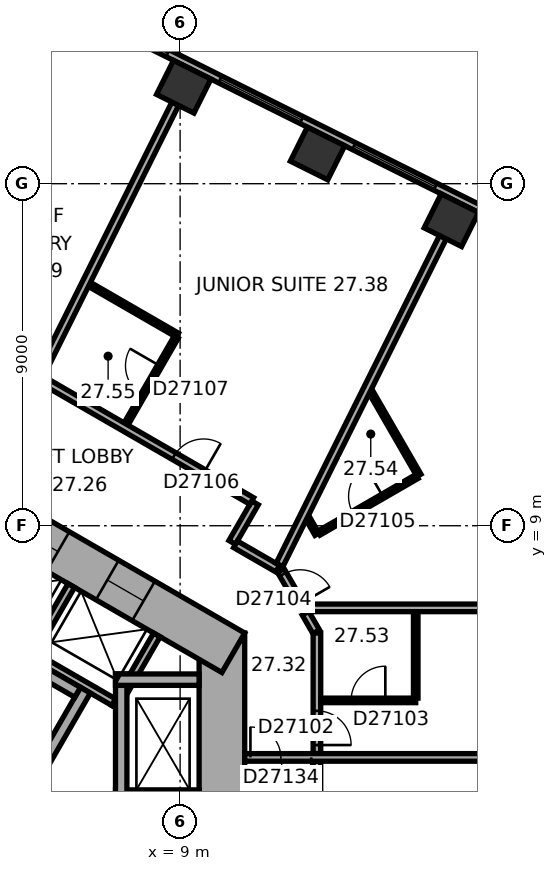
"""IFC4 building model, lengths in metres.
Left out: names, types, materials, properties, quantities, classifications, styles, units other than length and angle.
Written with IfcOpenShell. Run it as: python <this file> out.ifc"""

import sys

from ifc_helpers import new_model, si_unit, direction, frame, frame_2d, origin, origin_2d, place, context, subcontext, project, spatial, rectangle, extrude, element, fill, save


model = new_model("IFC4")
c1 = context("Model", 3, precision=1e-05, world=origin(), true_north=direction((0.0, 1.0)))
c2 = subcontext(c1, "Body", "Model", "MODEL_VIEW")
j1 = project(units=[si_unit("LENGTHUNIT", "METRE"), si_unit("PLANEANGLEUNIT", "RADIAN")], contexts=[c1])
p1 = place(None, origin())
s1 = spatial("IfcSite", under=j1, at=p1, CompositionType="ELEMENT")
p2 = place(p1, origin())
s2 = spatial("IfcBuilding", under=s1, at=p2, CompositionType="ELEMENT")
p3 = place(p2, frame((0.0, 0.0, 113.3)))
s3 = spatial("IfcBuildingStorey", under=s2, at=p3, CompositionType="ELEMENT", Elevation=113.3)
for number, where, z_axis, x_axis in (
    (1, (16.138, 17.04, 0.0), (0.0, 0.0, 1.0), (-0.895, 0.446, 0.0)),
    (2, (12.616, 18.795, 0.0), (0.0, 0.0, 1.0), (-0.895, 0.446, 0.0)),
    (3, (9.095, 20.551, 0.0), (0.0, 0.0, 1.0), (-0.895, 0.446, 0.0)),
):
    element("IfcColumn", number, at=place(p3, frame(where, z_axis=z_axis, x_axis=x_axis)), inside=s3, PredefinedType="COLUMN", context=c2, shape_type="SweptSolid", body=[
        extrude(rectangle(XDim=1.1, YDim=1.0, at=origin_2d()), origin(), (0.0, 0.0, 1.0), 3.3),
    ])
p4 = place(p3, frame((10.1, -6.177, 0.0), z_axis=(0.0, 0.0, 1.0), x_axis=(0.0, 1.0, 0.0)))
e4 = element("IfcWall", 4, at=p4, inside=s3, PredefinedType="SHEAR", context=c2, shape_type="SweptSolid", body=[
    extrude(rectangle(XDim=12.355, YDim=1.2, at=frame_2d((6.177, 0.0))), origin(), (0.0, 0.0, 1.0), 3.3),
])
p5 = place(p4, frame((6.378, 0.0, 0.0)))
e5 = element("IfcOpeningElement", 5, at=p5, cuts=e4, PredefinedType="OPENING", context=c2, shape_type="SweptSolid", body=[
    extrude(rectangle(XDim=1.5, YDim=2.1, at=frame_2d((0.75, 1.05))), frame((0.0, 0.61, 0.0), z_axis=(0.0, -1.0, 0.0), x_axis=(1.0, 0.0, 0.0)), (0.0, 0.0, 1.0), 1.22),
])
p6 = place(p4, frame((1.828, 0.0, 0.0)))
e6 = element("IfcOpeningElement", 6, at=p6, cuts=e4, PredefinedType="OPENING", context=c2, shape_type="SweptSolid", body=[
    extrude(rectangle(XDim=1.1, YDim=2.1, at=frame_2d((0.55, 1.05))), frame((0.0, 0.61, 0.0), z_axis=(0.0, -1.0, 0.0), x_axis=(1.0, 0.0, 0.0)), (0.0, 0.0, 1.0), 1.22),
])
p7 = place(p4, frame((4.427, 0.0, 0.0)))
e7 = element("IfcOpeningElement", 7, at=p7, cuts=e4, PredefinedType="OPENING", context=c2, shape_type="SweptSolid", body=[
    extrude(rectangle(XDim=1.1, YDim=2.1, at=frame_2d((0.55, 1.05))), frame((0.0, 0.61, 0.0), z_axis=(0.0, -1.0, 0.0), x_axis=(1.0, 0.0, 0.0)), (0.0, 0.0, 1.0), 1.22),
])
p8 = place(p3, frame((10.4, 5.658, 0.0), z_axis=(0.0, 0.0, 1.0), x_axis=(-0.866021384402, 0.500006961711, 0.0)))
e8 = element("IfcWall", 8, at=p8, inside=s3, PredefinedType="SHEAR", context=c2, shape_type="SweptSolid", body=[
    extrude(rectangle(XDim=12.355, YDim=1.2, at=frame_2d((6.178, 0.0))), origin(), (0.0, 0.0, 1.0), 3.3),
])
p9 = place(p8, frame((2.728, 0.0, 0.0)))
e9 = element("IfcOpeningElement", 9, at=p9, cuts=e8, PredefinedType="OPENING", context=c2, shape_type="SweptSolid", body=[
    extrude(rectangle(XDim=1.1, YDim=2.1, at=frame_2d((0.55, 1.05))), frame((0.0, 0.61, 0.0), z_axis=(0.0, -1.0, 0.0), x_axis=(1.0, 0.0, 0.0)), (0.0, 0.0, 1.0), 1.22),
])
p10 = place(p8, frame((5.328, 0.0, 0.0)))
e10 = element("IfcOpeningElement", 10, at=p10, cuts=e8, PredefinedType="OPENING", context=c2, shape_type="SweptSolid", body=[
    extrude(rectangle(XDim=1.1, YDim=2.1, at=frame_2d((0.55, 1.05))), frame((0.0, 0.61, 0.0), z_axis=(0.0, -1.0, 0.0), x_axis=(1.0, 0.0, 0.0)), (0.0, 0.0, 1.0), 1.22),
])
p11 = place(p8, frame((7.928, 0.0, 0.0)))
e11 = element("IfcOpeningElement", 11, at=p11, cuts=e8, PredefinedType="OPENING", context=c2, shape_type="SweptSolid", body=[
    extrude(rectangle(XDim=1.1, YDim=2.1, at=frame_2d((0.55, 1.05))), frame((0.0, 0.61, 0.0), z_axis=(0.0, -1.0, 0.0), x_axis=(1.0, 0.0, 0.0)), (0.0, 0.0, 1.0), 1.22),
])
p12 = place(p3, frame((20.63, 15.47, 0.0), z_axis=(0.0, 0.0, 1.0), x_axis=(-0.894934518609, 0.446197498203, 0.0)))
e12 = element("IfcWall", 12, at=p12, inside=s3, PredefinedType="STANDARD", context=c2, shape_type="SweptSolid", body=[
    extrude(rectangle(XDim=21.246, YDim=0.2, at=frame_2d((10.623, 0.0))), origin(), (0.0, 0.0, 1.0), 3.3),
])
p13 = place(p12, frame((1.553, 0.0, 0.8)))
e13 = element("IfcOpeningElement", 13, at=p13, cuts=e12, PredefinedType="OPENING", context=c2, shape_type="SweptSolid", body=[
    extrude(rectangle(XDim=2.4, YDim=1.7, at=frame_2d((1.2, 0.85))), frame((0.0, 0.11, 0.0), z_axis=(0.0, -1.0, 0.0), x_axis=(1.0, 0.0, 0.0)), (0.0, 0.0, 1.0), 0.22),
])
p14 = place(p12, frame((5.488, 0.0, 0.8)))
e14 = element("IfcOpeningElement", 14, at=p14, cuts=e12, PredefinedType="OPENING", context=c2, shape_type="SweptSolid", body=[
    extrude(rectangle(XDim=2.4, YDim=1.7, at=frame_2d((1.2, 0.85))), frame((0.0, 0.11, 0.0), z_axis=(0.0, -1.0, 0.0), x_axis=(1.0, 0.0, 0.0)), (0.0, 0.0, 1.0), 0.22),
])
p15 = place(p12, frame((9.422, 0.0, 0.8)))
e15 = element("IfcOpeningElement", 15, at=p15, cuts=e12, PredefinedType="OPENING", context=c2, shape_type="SweptSolid", body=[
    extrude(rectangle(XDim=2.4, YDim=1.7, at=frame_2d((1.2, 0.85))), frame((0.0, 0.11, 0.0), z_axis=(0.0, -1.0, 0.0), x_axis=(1.0, 0.0, 0.0)), (0.0, 0.0, 1.0), 0.22),
])
p16 = place(p12, frame((13.357, 0.0, 0.8)))
e16 = element("IfcOpeningElement", 16, at=p16, cuts=e12, PredefinedType="OPENING", context=c2, shape_type="SweptSolid", body=[
    extrude(rectangle(XDim=2.4, YDim=1.7, at=frame_2d((1.2, 0.85))), frame((0.0, 0.11, 0.0), z_axis=(0.0, -1.0, 0.0), x_axis=(1.0, 0.0, 0.0)), (0.0, 0.0, 1.0), 0.22),
])
p17 = place(p12, frame((17.292, 0.0, 0.8)))
e17 = element("IfcOpeningElement", 17, at=p17, cuts=e12, PredefinedType="OPENING", context=c2, shape_type="SweptSolid", body=[
    extrude(rectangle(XDim=2.4, YDim=1.7, at=frame_2d((1.2, 0.85))), frame((0.0, 0.11, 0.0), z_axis=(0.0, -1.0, 0.0), x_axis=(1.0, 0.0, 0.0)), (0.0, 0.0, 1.0), 0.22),
])
p18 = place(p3, frame((7.424, 4.259, 0.0), z_axis=(0.0, 0.0, 1.0), x_axis=(-0.866026010844, 0.49999894854, 0.0)))
e18 = element("IfcWall", 18, at=p18, inside=s3, PredefinedType="PARTITIONING", context=c2, shape_type="SweptSolid", body=[
    extrude(rectangle(XDim=8.0, YDim=0.2, at=frame_2d((4.0, 0.0))), origin(), (0.0, 0.0, 1.0), 3.05),
])
for number, where, z_axis, x_axis in (
    (19, (7.287, 4.222, 0.0), (0.0, 0.0, 1.0), (0.5, 0.866, 0.0)),
    (20, (5.036, 5.522, 0.0), (0.0, 0.0, 1.0), (0.5, 0.866, 0.0)),
):
    element("IfcWall", number, at=place(p3, frame(where, z_axis=z_axis, x_axis=x_axis)), inside=s3, PredefinedType="PARTITIONING", context=c2, shape_type="SweptSolid", body=[
        extrude(rectangle(XDim=2.2, YDim=0.2, at=frame_2d((1.1, 0.0))), origin(), (0.0, 0.0, 1.0), 3.05),
    ])
p19 = place(p3, frame((4.158, 0.602, 0.0), z_axis=(0.0, 0.0, 1.0), x_axis=(0.499977259774, 0.866038532462, 0.0)))
e21 = element("IfcWall", 21, at=p19, inside=s3, PredefinedType="SHEAR", context=c2, shape_type="SweptSolid", body=[
    extrude(rectangle(XDim=4.7, YDim=0.3, at=frame_2d((2.35, 0.0))), origin(), (0.0, 0.0, 1.0), 3.05),
])
p20 = place(p19, frame((0.8, 0.0, 0.0)))
e22 = element("IfcOpeningElement", 22, at=p20, cuts=e21, PredefinedType="OPENING", context=c2, shape_type="SweptSolid", body=[
    extrude(rectangle(XDim=1.2, YDim=2.1, at=frame_2d((0.6, 1.05))), frame((0.0, 0.16, 0.0), z_axis=(0.0, -1.0, 0.0), x_axis=(1.0, 0.0, 0.0)), (0.0, 0.0, 1.0), 0.32),
])
p21 = place(p3, frame((6.303, 4.617, 0.0), z_axis=(0.0, 0.0, 1.0), x_axis=(-0.866027801685, 0.499995846692, 0.0)))
e23 = element("IfcWall", 23, at=p21, inside=s3, PredefinedType="SHEAR", context=c2, shape_type="SweptSolid", body=[
    extrude(rectangle(XDim=7.06, YDim=0.3, at=frame_2d((3.53, 0.0))), origin(), (0.0, 0.0, 1.0), 3.05),
])
p22 = place(p3, frame((7.3, 1.9, 0.0), z_axis=(0.0, 0.0, 1.0), x_axis=(1.0, 0.0, 0.0)))
e24 = element("IfcWall", 24, at=p22, inside=s3, PredefinedType="SHEAR", context=c2, shape_type="SweptSolid", body=[
    extrude(rectangle(XDim=2.2, YDim=0.3, at=frame_2d((1.1, 0.0))), origin(), (0.0, 0.0, 1.0), 3.05),
])
p23 = place(p22, frame((0.7, 0.0, 0.0)))
e25 = element("IfcOpeningElement", 25, at=p23, cuts=e24, PredefinedType="OPENING", context=c2, shape_type="SweptSolid", body=[
    extrude(rectangle(XDim=1.1, YDim=2.1, at=frame_2d((0.55, 1.05))), frame((0.0, 0.16, 0.0), z_axis=(0.0, -1.0, 0.0), x_axis=(1.0, 0.0, 0.0)), (0.0, 0.0, 1.0), 0.32),
])
p24 = place(p3, frame((7.45, 1.75, 0.0), z_axis=(0.0, 0.0, 1.0), x_axis=(0.0, 1.0, 0.0)))
e26 = element("IfcWall", 26, at=p24, inside=s3, PredefinedType="SHEAR", context=c2, shape_type="SweptSolid", body=[
    extrude(rectangle(XDim=3.35, YDim=0.3, at=frame_2d((1.675, 0.0))), origin(), (0.0, 0.0, 1.0), 3.05),
])
p25 = place(p3, frame((7.3, 4.95, 0.0), z_axis=(0.0, 0.0, 1.0), x_axis=(1.0, 0.0, 0.0)))
e27 = element("IfcWall", 27, at=p25, inside=s3, PredefinedType="SHEAR", context=c2, shape_type="SweptSolid", body=[
    extrude(rectangle(XDim=2.2, YDim=0.3, at=frame_2d((1.1, 0.0))), origin(), (0.0, 0.0, 1.0), 3.05),
])
p26 = place(p3, frame((6.614, 15.351, 0.0), z_axis=(0.0, 0.0, 1.0), x_axis=(0.866024262117, -0.500001977421, 0.0)))
e28 = element("IfcWall", 28, at=p26, inside=s3, PredefinedType="PARTITIONING", context=c2, shape_type="SweptSolid", body=[
    extrude(rectangle(XDim=2.671, YDim=0.12, at=frame_2d((1.336, 0.0))), origin(), (0.0, 0.0, 1.0), 3.05),
])
p27 = place(p3, frame((8.872, 20.104, 0.0), z_axis=(0.0, 0.0, 1.0), x_axis=(-0.446218378653, -0.894924107706, 0.0)))
e29 = element("IfcWall", 29, at=p27, inside=s3, PredefinedType="PARTITIONING", context=c2, shape_type="SweptSolid", body=[
    extrude(rectangle(XDim=7.95, YDim=0.2, at=frame_2d((3.975, 0.0))), origin(), (0.0, 0.0, 1.0), 3.05),
])
p28 = place(p3, frame((8.897, 13.963, 0.0), z_axis=(0.0, 0.0, 1.0), x_axis=(-0.500048002682, -0.865997687649, 0.0)))
e30 = element("IfcWall", 30, at=p28, inside=s3, PredefinedType="PARTITIONING", context=c2, shape_type="SweptSolid", body=[
    extrude(rectangle(XDim=2.64, YDim=0.12, at=frame_2d((1.32, 0.0))), origin(), (0.0, 0.0, 1.0), 2.6),
])
p29 = place(p28, frame((0.87, 0.0, 0.0)))
e31 = element("IfcOpeningElement", 31, at=p29, cuts=e30, PredefinedType="OPENING", context=c2, shape_type="SweptSolid", body=[
    extrude(rectangle(XDim=0.9, YDim=2.1, at=frame_2d((0.45, 1.05))), frame((0.0, 0.07, 0.0), z_axis=(0.0, -1.0, 0.0), x_axis=(1.0, 0.0, 0.0)), (0.0, 0.0, 1.0), 0.14),
])
p30 = place(p3, frame((10.371, 8.561, 0.0), z_axis=(0.0, 0.0, 1.0), x_axis=(0.499986357472, 0.866033280158, 0.0)))
e32 = element("IfcWall", 32, at=p30, inside=s3, PredefinedType="PARTITIONING", context=c2, shape_type="SweptSolid", body=[
    extrude(rectangle(XDim=1.201, YDim=0.2, at=frame_2d((0.601, 0.0))), origin(), (0.0, 0.0, 1.0), 3.05),
])
p31 = place(p3, frame((10.885, 9.652, 0.0), z_axis=(0.0, 0.0, 1.0), x_axis=(-0.866033868542, 0.499985338323, 0.0)))
e33 = element("IfcWall", 33, at=p31, inside=s3, PredefinedType="PARTITIONING", context=c2, shape_type="SweptSolid", body=[
    extrude(rectangle(XDim=8.602, YDim=0.2, at=frame_2d((4.301, 0.0))), origin(), (0.0, 0.0, 1.0), 3.05),
])
p32 = place(p31, frame((1.464, 0.0, 0.0)))
e34 = element("IfcOpeningElement", 34, at=p32, cuts=e33, PredefinedType="OPENING", context=c2, shape_type="SweptSolid", body=[
    extrude(rectangle(XDim=0.9, YDim=2.1, at=frame_2d((0.45, 1.05))), frame((0.0, 0.11, 0.0), z_axis=(0.0, -1.0, 0.0), x_axis=(1.0, 0.0, 0.0)), (0.0, 0.0, 1.0), 0.22),
])
p33 = place(p31, frame((7.09, 0.0, 0.0)))
e35 = element("IfcOpeningElement", 35, at=p33, cuts=e33, PredefinedType="OPENING", context=c2, shape_type="SweptSolid", body=[
    extrude(rectangle(XDim=0.9, YDim=2.1, at=frame_2d((0.45, 1.05))), frame((0.0, 0.11, 0.0), z_axis=(0.0, -1.0, 0.0), x_axis=(1.0, 0.0, 0.0)), (0.0, 0.0, 1.0), 0.22),
])
p34 = place(p3, frame((11.566, 7.871, 0.0), z_axis=(0.0, 0.0, 1.0), x_axis=(-0.866004557827, 0.500036104519, 0.0)))
e36 = element("IfcWall", 36, at=p34, inside=s3, PredefinedType="PARTITIONING", context=c2, shape_type="SweptSolid", body=[
    extrude(rectangle(XDim=1.28, YDim=0.2, at=frame_2d((0.64, 0.0))), origin(), (0.0, 0.0, 1.0), 3.05),
])
p35 = place(p3, frame((12.218, 6.839, 0.0), z_axis=(0.0, 0.0, 1.0), x_axis=(-0.500044870432, 0.865999496279, 0.0)))
e37 = element("IfcWall", 37, at=p35, inside=s3, PredefinedType="PARTITIONING", context=c2, shape_type="SweptSolid", body=[
    extrude(rectangle(XDim=1.136, YDim=0.2, at=frame_2d((0.568, 0.0))), origin(), (0.0, 0.0, 1.0), 3.05),
])
p36 = place(p35, frame((0.118, 0.0, 0.0)))
e38 = element("IfcOpeningElement", 38, at=p36, cuts=e37, PredefinedType="OPENING", context=c2, shape_type="SweptSolid", body=[
    extrude(rectangle(XDim=0.9, YDim=2.1, at=frame_2d((0.45, 1.05))), frame((0.0, 0.11, 0.0), z_axis=(0.0, -1.0, 0.0), x_axis=(1.0, 0.0, 0.0)), (0.0, 0.0, 1.0), 0.22),
])
p37 = place(p3, frame((12.58, 6.212, 0.0), z_axis=(0.0, 0.0, 1.0), x_axis=(-0.499936258447, 0.86606220186, 0.0)))
e39 = element("IfcWall", 39, at=p37, inside=s3, PredefinedType="PARTITIONING", context=c2, shape_type="SweptSolid", body=[
    extrude(rectangle(XDim=0.56, YDim=0.2, at=frame_2d((0.28, 0.0))), origin(), (0.0, 0.0, 1.0), 3.05),
])
p38 = place(p3, frame((12.6, 0.201, 0.0), z_axis=(0.0, 0.0, 1.0), x_axis=(0.0, 1.0, 0.0)))
e40 = element("IfcWall", 40, at=p38, inside=s3, PredefinedType="PARTITIONING", context=c2, shape_type="SweptSolid", body=[
    extrude(rectangle(XDim=2.604, YDim=0.2, at=frame_2d((1.302, 0.0))), origin(), (0.0, 0.0, 1.0), 3.05),
])
p39 = place(p3, frame((12.6, 3.004, 0.0), z_axis=(0.0, 0.0, 1.0), x_axis=(0.0, 1.0, 0.0)))
e41 = element("IfcWall", 41, at=p39, inside=s3, PredefinedType="PARTITIONING", context=c2, shape_type="SweptSolid", body=[
    extrude(rectangle(XDim=3.173, YDim=0.2, at=frame_2d((1.586, 0.0))), origin(), (0.0, 0.0, 1.0), 3.05),
])
p40 = place(p39, frame((0.225, 0.0, 0.0)))
e42 = element("IfcOpeningElement", 42, at=p40, cuts=e41, PredefinedType="OPENING", context=c2, shape_type="SweptSolid", body=[
    extrude(rectangle(XDim=0.9, YDim=2.1, at=frame_2d((0.45, 1.05))), frame((0.0, 0.11, 0.0), z_axis=(0.0, -1.0, 0.0), x_axis=(1.0, 0.0, 0.0)), (0.0, 0.0, 1.0), 0.22),
])
p41 = place(p3, frame((12.601, 8.776, 0.0), z_axis=(0.0, 0.0, 1.0), x_axis=(-0.500166486798, 0.865929261247, 0.0)))
e43 = element("IfcWall", 43, at=p41, inside=s3, PredefinedType="PARTITIONING", context=c2, shape_type="SweptSolid", body=[
    extrude(rectangle(XDim=0.476, YDim=0.12, at=frame_2d((0.238, 0.0))), origin(), (0.0, 0.0, 1.0), 3.05),
])
p42 = place(p3, frame((14.022, 12.515, 0.0), z_axis=(0.0, 0.0, 1.0), x_axis=(0.499962146402, -0.866047257466, 0.0)))
e44 = element("IfcWall", 44, at=p42, inside=s3, PredefinedType="PARTITIONING", context=c2, shape_type="SweptSolid", body=[
    extrude(rectangle(XDim=2.528, YDim=0.12, at=frame_2d((1.264, 0.0))), origin(), (0.0, 0.0, 1.0), 3.05),
])
p43 = place(p3, frame((15.2, 4.405, 0.0), z_axis=(0.0, 0.0, 1.0), x_axis=(-1.0, 0.0, 0.0)))
e45 = element("IfcWall", 45, at=p43, inside=s3, PredefinedType="PARTITIONING", context=c2, shape_type="SweptSolid", body=[
    extrude(rectangle(XDim=2.5, YDim=0.12, at=frame_2d((1.25, 0.0))), origin(), (0.0, 0.0, 1.0), 3.05),
])
p44 = place(p43, frame((0.8, 0.0, 0.0)))
e46 = element("IfcOpeningElement", 46, at=p44, cuts=e45, PredefinedType="OPENING", context=c2, shape_type="SweptSolid", body=[
    extrude(rectangle(XDim=0.9, YDim=2.1, at=frame_2d((0.45, 1.05))), frame((0.0, 0.07, 0.0), z_axis=(0.0, -1.0, 0.0), x_axis=(1.0, 0.0, 0.0)), (0.0, 0.0, 1.0), 0.14),
])
p45 = place(p3, frame((15.2, 6.739, 0.0), z_axis=(0.0, 0.0, 1.0), x_axis=(0.0, -1.0, 0.0)))
e47 = element("IfcWall", 47, at=p45, inside=s3, PredefinedType="PARTITIONING", context=c2, shape_type="SweptSolid", body=[
    extrude(rectangle(XDim=2.274, YDim=0.12, at=frame_2d((1.137, 0.0))), origin(), (0.0, 0.0, 1.0), 3.05),
])
p46 = place(p3, frame((15.233, 10.296, 0.0), z_axis=(0.0, 0.0, 1.0), x_axis=(-0.866010940986, -0.500025049464, 0.0)))
e48 = element("IfcWall", 48, at=p46, inside=s3, PredefinedType="PARTITIONING", context=c2, shape_type="SweptSolid", body=[
    extrude(rectangle(XDim=2.98, YDim=0.12, at=frame_2d((1.49, 0.0))), origin(), (0.0, 0.0, 1.0), 3.05),
])
p47 = place(p46, frame((1.04, 0.0, 0.0)))
e49 = element("IfcOpeningElement", 49, at=p47, cuts=e48, PredefinedType="OPENING", context=c2, shape_type="SweptSolid", body=[
    extrude(rectangle(XDim=0.9, YDim=2.1, at=frame_2d((0.45, 1.05))), frame((0.0, 0.07, 0.0), z_axis=(0.0, -1.0, 0.0), x_axis=(1.0, 0.0, 0.0)), (0.0, 0.0, 1.0), 0.14),
])
p48 = place(p3, frame((15.915, 16.592, 0.0), z_axis=(0.0, 0.0, 1.0), x_axis=(-0.446199736347, -0.894933402709, 0.0)))
e50 = element("IfcWall", 50, at=p48, inside=s3, PredefinedType="PARTITIONING", context=c2, shape_type="SweptSolid", body=[
    extrude(rectangle(XDim=9.635, YDim=0.2, at=frame_2d((4.817, 0.0))), origin(), (0.0, 0.0, 1.0), 3.05),
])
p49 = place(p3, frame((21.95, 2.905, 0.0), z_axis=(0.0, 0.0, 1.0), x_axis=(-1.0, 0.0, 0.0)))
e51 = element("IfcWall", 51, at=p49, inside=s3, PredefinedType="PARTITIONING", context=c2, shape_type="SweptSolid", body=[
    extrude(rectangle(XDim=11.25, YDim=0.2, at=frame_2d((5.625, 0.0))), origin(), (0.0, 0.0, 1.0), 3.05),
])
p50 = place(p49, frame((9.5, 0.0, 0.0)))
e52 = element("IfcOpeningElement", 52, at=p50, cuts=e51, PredefinedType="OPENING", context=c2, shape_type="SweptSolid", body=[
    extrude(rectangle(XDim=1.6, YDim=2.1, at=frame_2d((0.8, 1.05))), frame((0.0, 0.11, 0.0), z_axis=(0.0, -1.0, 0.0), x_axis=(1.0, 0.0, 0.0)), (0.0, 0.0, 1.0), 0.22),
])
p51 = place(p3, frame((21.95, 6.839, 0.0), z_axis=(0.0, 0.0, 1.0), x_axis=(-1.0, 0.0, 0.0)))
e53 = element("IfcWall", 53, at=p51, inside=s3, PredefinedType="PARTITIONING", context=c2, shape_type="SweptSolid", body=[
    extrude(rectangle(XDim=9.65, YDim=0.2, at=frame_2d((4.825, 0.0))), origin(), (0.0, 0.0, 1.0), 3.05),
])
p52 = place(p14, origin())
e54 = element("IfcWindow", 54, at=p52, inside=s3, PartitioningType="SINGLE_PANEL", PredefinedType="WINDOW", context=c2, shape_type="SweptSolid", body=[
    extrude(rectangle(XDim=2.4, YDim=1.7, at=frame_2d((1.2, 0.85))), frame((0.0, 0.03, 0.0), z_axis=(0.0, -1.0, 0.0), x_axis=(1.0, 0.0, 0.0)), (0.0, 0.0, 1.0), 0.06),
])
fill(e14, e54)
p53 = place(p15, origin())
e55 = element("IfcWindow", 55, at=p53, inside=s3, PartitioningType="SINGLE_PANEL", PredefinedType="WINDOW", context=c2, shape_type="SweptSolid", body=[
    extrude(rectangle(XDim=2.4, YDim=1.7, at=frame_2d((1.2, 0.85))), frame((0.0, 0.03, 0.0), z_axis=(0.0, -1.0, 0.0), x_axis=(1.0, 0.0, 0.0)), (0.0, 0.0, 1.0), 0.06),
])
fill(e15, e55)
p54 = place(p16, origin())
e56 = element("IfcWindow", 56, at=p54, inside=s3, PartitioningType="SINGLE_PANEL", PredefinedType="WINDOW", context=c2, shape_type="SweptSolid", body=[
    extrude(rectangle(XDim=2.4, YDim=1.7, at=frame_2d((1.2, 0.85))), frame((0.0, 0.03, 0.0), z_axis=(0.0, -1.0, 0.0), x_axis=(1.0, 0.0, 0.0)), (0.0, 0.0, 1.0), 0.06),
])
fill(e16, e56)
p55 = place(p9, origin())
e57 = element("IfcDoor", 57, at=p55, inside=s3, OperationType="DOUBLE_DOOR_SLIDING", PredefinedType="DOOR", context=c2, shape_type="SweptSolid", body=[
    extrude(rectangle(XDim=1.1, YDim=2.1, at=frame_2d((0.55, 1.05))), frame((0.0, 0.025, 0.0), z_axis=(0.0, -1.0, 0.0), x_axis=(1.0, 0.0, 0.0)), (0.0, 0.0, 1.0), 0.05),
])
fill(e9, e57)
p56 = place(p10, origin())
e58 = element("IfcDoor", 58, at=p56, inside=s3, OperationType="DOUBLE_DOOR_SLIDING", PredefinedType="DOOR", context=c2, shape_type="SweptSolid", body=[
    extrude(rectangle(XDim=1.1, YDim=2.1, at=frame_2d((0.55, 1.05))), frame((0.0, 0.025, 0.0), z_axis=(0.0, -1.0, 0.0), x_axis=(1.0, 0.0, 0.0)), (0.0, 0.0, 1.0), 0.05),
])
fill(e10, e58)
p57 = place(p40, origin())
e59 = element("IfcDoor", 59, at=p57, inside=s3, OperationType="SINGLE_SWING_LEFT", PredefinedType="DOOR", context=c2, shape_type="SweptSolid", body=[
    extrude(rectangle(XDim=0.9, YDim=2.1, at=frame_2d((0.45, 1.05))), frame((0.0, 0.025, 0.0), z_axis=(0.0, -1.0, 0.0), x_axis=(1.0, 0.0, 0.0)), (0.0, 0.0, 1.0), 0.05),
])
fill(e42, e59)
p58 = place(p44, origin())
e60 = element("IfcDoor", 60, at=p58, inside=s3, OperationType="SINGLE_SWING_LEFT", PredefinedType="DOOR", context=c2, shape_type="SweptSolid", body=[
    extrude(rectangle(XDim=0.9, YDim=2.1, at=frame_2d((0.45, 1.05))), frame((0.0, 0.025, 0.0), z_axis=(0.0, -1.0, 0.0), x_axis=(1.0, 0.0, 0.0)), (0.0, 0.0, 1.0), 0.05),
])
fill(e46, e60)
p59 = place(p36, origin())
e61 = element("IfcDoor", 61, at=p59, inside=s3, OperationType="SINGLE_SWING_LEFT", PredefinedType="DOOR", context=c2, shape_type="SweptSolid", body=[
    extrude(rectangle(XDim=0.9, YDim=2.1, at=frame_2d((0.45, 1.05))), frame((0.0, 0.025, 0.0), z_axis=(0.0, -1.0, 0.0), x_axis=(1.0, 0.0, 0.0)), (0.0, 0.0, 1.0), 0.05),
])
fill(e38, e61)
p60 = place(p47, origin())
e62 = element("IfcDoor", 62, at=p60, inside=s3, OperationType="SINGLE_SWING_LEFT", PredefinedType="DOOR", context=c2, shape_type="SweptSolid", body=[
    extrude(rectangle(XDim=0.9, YDim=2.1, at=frame_2d((0.45, 1.05))), frame((0.0, 0.025, 0.0), z_axis=(0.0, -1.0, 0.0), x_axis=(1.0, 0.0, 0.0)), (0.0, 0.0, 1.0), 0.05),
])
fill(e49, e62)
p61 = place(p32, origin())
e63 = element("IfcDoor", 63, at=p61, inside=s3, OperationType="SINGLE_SWING_LEFT", PredefinedType="DOOR", context=c2, shape_type="SweptSolid", body=[
    extrude(rectangle(XDim=0.9, YDim=2.1, at=frame_2d((0.45, 1.05))), frame((0.0, 0.025, 0.0), z_axis=(0.0, -1.0, 0.0), x_axis=(1.0, 0.0, 0.0)), (0.0, 0.0, 1.0), 0.05),
])
fill(e34, e63)
p62 = place(p29, origin())
e64 = element("IfcDoor", 64, at=p62, inside=s3, OperationType="SINGLE_SWING_LEFT", PredefinedType="DOOR", context=c2, shape_type="SweptSolid", body=[
    extrude(rectangle(XDim=0.9, YDim=2.1, at=frame_2d((0.45, 1.05))), frame((0.0, 0.025, 0.0), z_axis=(0.0, -1.0, 0.0), x_axis=(1.0, 0.0, 0.0)), (0.0, 0.0, 1.0), 0.05),
])
fill(e31, e64)
p63 = place(p50, origin())
e65 = element("IfcDoor", 65, at=p63, inside=s3, OperationType="DOUBLE_DOOR_SINGLE_SWING", PredefinedType="DOOR", context=c2, shape_type="SweptSolid", body=[
    extrude(rectangle(XDim=1.6, YDim=2.1, at=frame_2d((0.8, 1.05))), frame((0.0, 0.025, 0.0), z_axis=(0.0, -1.0, 0.0), x_axis=(1.0, 0.0, 0.0)), (0.0, 0.0, 1.0), 0.05),
])
fill(e52, e65)
save(model, sys.argv[1])
